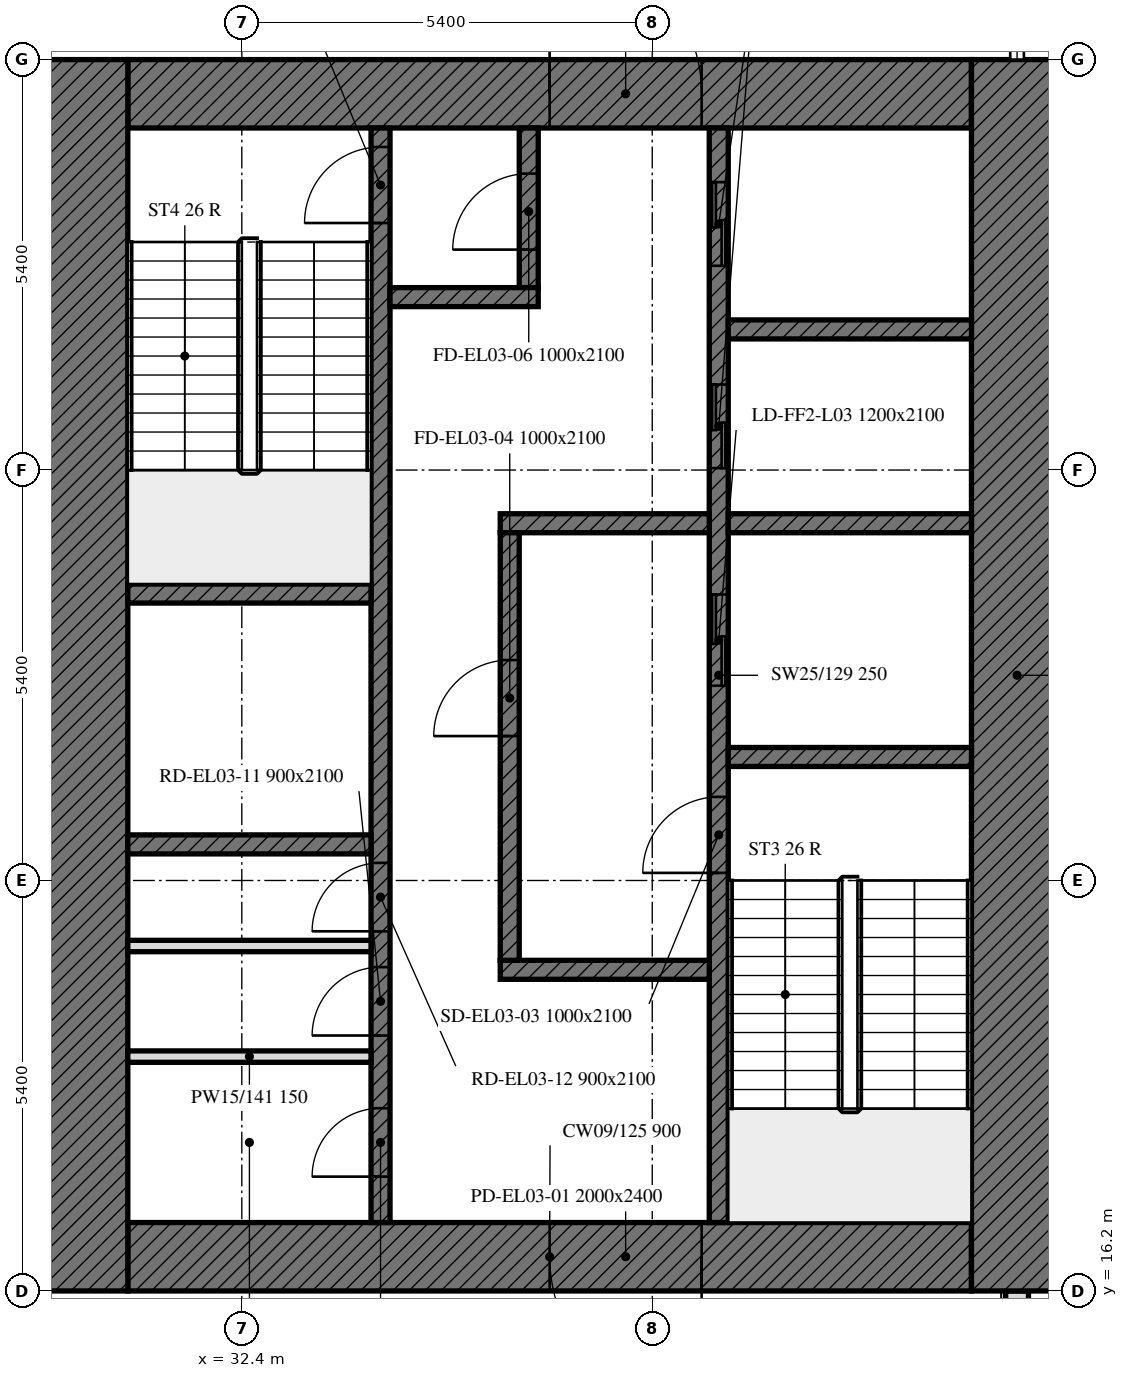
"""IFC4 building model, lengths in metres.
Left out: names, types, materials, properties, quantities, classifications, styles, units other than length and angle.
Written with IfcOpenShell. Run it as: python <this file> out.ifc"""

import sys

from ifc_helpers import new_model, si_unit, direction, frame, frame_2d, origin, place, context, subcontext, project, spatial, rectangle, extrude, element, fill, save


model = new_model("IFC4")
c1 = context("Model", 3, precision=1e-05, world=origin(), true_north=direction((0.0, 1.0)))
c2 = subcontext(c1, "Body", "Model", "MODEL_VIEW")
j1 = project(units=[si_unit("LENGTHUNIT", "METRE"), si_unit("PLANEANGLEUNIT", "RADIAN")], contexts=[c1])
p1 = place(None, origin())
s1 = spatial("IfcSite", under=j1, at=p1, CompositionType="ELEMENT")
p2 = place(p1, origin())
s2 = spatial("IfcBuilding", under=s1, at=p2, CompositionType="ELEMENT")
p3 = place(p2, frame((0.0, 0.0, 19.8)))
s3 = spatial("IfcBuildingStorey", under=s2, at=p3, CompositionType="ELEMENT", Elevation=19.8)
p4 = place(p3, frame((42.6, 5.586, 0.0), z_axis=(0.0, 0.0, 1.0), x_axis=(0.0, 1.0, 0.0)))
e1 = element("IfcWall", 1, at=p4, inside=s3, PredefinedType="SOLIDWALL", context=c2, shape_type="SweptSolid", body=[
    extrude(rectangle(XDim=10.614, YDim=0.3, at=frame_2d((5.307, 0.0))), origin(), (0.0, 0.0, 1.0), 4.4),
])
p5 = place(p4, frame((1.614, 0.0, 0.0)))
e2 = element("IfcOpeningElement", 2, at=p5, cuts=e1, PredefinedType="OPENING", context=c2, shape_type="SweptSolid", body=[
    extrude(rectangle(XDim=1.8, YDim=2.4, at=frame_2d((0.9, 1.2))), frame((0.0, 0.16, 0.0), z_axis=(0.0, -1.0, 0.0), x_axis=(1.0, 0.0, 0.0)), (0.0, 0.0, 1.0), 0.32),
])
p6 = place(p4, frame((6.114, 0.0, 0.0)))
e3 = element("IfcOpeningElement", 3, at=p6, cuts=e1, PredefinedType="OPENING", context=c2, shape_type="SweptSolid", body=[
    extrude(rectangle(XDim=1.8, YDim=2.4, at=frame_2d((0.9, 1.2))), frame((0.0, 0.16, 0.0), z_axis=(0.0, -1.0, 0.0), x_axis=(1.0, 0.0, 0.0)), (0.0, 0.0, 1.0), 0.32),
])
p7 = place(p3, frame((42.0, 16.65, 0.0), z_axis=(0.0, 0.0, 1.0), x_axis=(-1.0, 0.0, 0.0)))
e4 = element("IfcWall", 4, at=p7, inside=s3, PredefinedType="SOLIDWALL", context=c2, shape_type="SweptSolid", body=[
    extrude(rectangle(XDim=11.1, YDim=0.9, at=frame_2d((5.55, 0.0))), origin(), (0.0, 0.0, 1.0), 4.4),
])
p8 = place(p7, frame((3.55, 0.0, 0.0)))
e5 = element("IfcOpeningElement", 5, at=p8, cuts=e4, PredefinedType="OPENING", context=c2, shape_type="SweptSolid", body=[
    extrude(rectangle(XDim=2.0, YDim=2.4, at=frame_2d((1.0, 1.2))), frame((0.0, 0.45, 0.0), z_axis=(0.0, -1.0, 0.0), x_axis=(1.0, 0.0, 0.0)), (0.0, 0.0, 1.0), 0.9),
])
p9 = place(p3, frame((30.9, 31.95, 0.0), z_axis=(0.0, 0.0, 1.0), x_axis=(1.0, 0.0, 0.0)))
e6 = element("IfcWall", 6, at=p9, inside=s3, PredefinedType="SOLIDWALL", context=c2, shape_type="SweptSolid", body=[
    extrude(rectangle(XDim=11.1, YDim=0.9, at=frame_2d((5.55, 0.0))), origin(), (0.0, 0.0, 1.0), 4.4),
])
p10 = place(p9, frame((5.55, 0.0, 0.0)))
e7 = element("IfcOpeningElement", 7, at=p10, cuts=e6, PredefinedType="OPENING", context=c2, shape_type="SweptSolid", body=[
    extrude(rectangle(XDim=2.0, YDim=2.4, at=frame_2d((1.0, 1.2))), frame((0.0, 0.45, 0.0), z_axis=(0.0, -1.0, 0.0), x_axis=(1.0, 0.0, 0.0)), (0.0, 0.0, 1.0), 0.9),
])
for number, where, z_axis, x_axis in (
    (8, (42.6, 32.4, 0.0), (0.0, 0.0, 1.0), (0.0, -1.0, 0.0)),
    (9, (30.3, 16.2, 0.0), (0.0, 0.0, 1.0), (0.0, 1.0, 0.0)),
):
    element("IfcWall", number, at=place(p3, frame(where, z_axis=z_axis, x_axis=x_axis)), inside=s3, PredefinedType="SOLIDWALL", context=c2, shape_type="SweptSolid", body=[
        extrude(rectangle(XDim=16.2, YDim=1.2, at=frame_2d((8.1, 0.0))), origin(), (0.0, 0.0, 1.0), 4.4),
    ])
p11 = place(p3, frame((38.675, 17.1, 0.0), z_axis=(0.0, 0.0, 1.0), x_axis=(0.0, 1.0, 0.0)))
e10 = element("IfcWall", 10, at=p11, inside=s3, PredefinedType="SOLIDWALL", context=c2, shape_type="SweptSolid", body=[
    extrude(rectangle(XDim=14.4, YDim=0.25, at=frame_2d((7.2, 0.0))), origin(), (0.0, 0.0, 1.0), 4.4),
])
p12 = place(p11, frame((4.6, 0.0, 0.0)))
e11 = element("IfcOpeningElement", 11, at=p12, cuts=e10, PredefinedType="OPENING", context=c2, shape_type="SweptSolid", body=[
    extrude(rectangle(XDim=1.0, YDim=2.1, at=frame_2d((0.5, 1.05))), frame((0.0, 0.125, 0.0), z_axis=(0.0, -1.0, 0.0), x_axis=(1.0, 0.0, 0.0)), (0.0, 0.0, 1.0), 0.25),
])
p13 = place(p11, frame((7.062, 0.0, 0.0)))
e12 = element("IfcOpeningElement", 12, at=p13, cuts=e10, PredefinedType="OPENING", context=c2, shape_type="SweptSolid", body=[
    extrude(rectangle(XDim=1.2, YDim=2.1, at=frame_2d((0.6, 1.05))), frame((0.0, 0.125, 0.0), z_axis=(0.0, -1.0, 0.0), x_axis=(1.0, 0.0, 0.0)), (0.0, 0.0, 1.0), 0.25),
])
p14 = place(p11, frame((9.925, 0.0, 0.0)))
e13 = element("IfcOpeningElement", 13, at=p14, cuts=e10, PredefinedType="OPENING", context=c2, shape_type="SweptSolid", body=[
    extrude(rectangle(XDim=1.1, YDim=2.1, at=frame_2d((0.55, 1.05))), frame((0.0, 0.125, 0.0), z_axis=(0.0, -1.0, 0.0), x_axis=(1.0, 0.0, 0.0)), (0.0, 0.0, 1.0), 0.25),
])
p15 = place(p11, frame((12.587, 0.0, 0.0)))
e14 = element("IfcOpeningElement", 14, at=p15, cuts=e10, PredefinedType="OPENING", context=c2, shape_type="SweptSolid", body=[
    extrude(rectangle(XDim=1.1, YDim=2.1, at=frame_2d((0.55, 1.05))), frame((0.0, 0.125, 0.0), z_axis=(0.0, -1.0, 0.0), x_axis=(1.0, 0.0, 0.0)), (0.0, 0.0, 1.0), 0.25),
])
p16 = place(p3, frame((34.225, 17.1, 0.0), z_axis=(0.0, 0.0, 1.0), x_axis=(0.0, 1.0, 0.0)))
e15 = element("IfcWall", 15, at=p16, inside=s3, PredefinedType="SOLIDWALL", context=c2, shape_type="SweptSolid", body=[
    extrude(rectangle(XDim=14.4, YDim=0.25, at=frame_2d((7.2, 0.0))), origin(), (0.0, 0.0, 1.0), 4.4),
])
p17 = place(p16, frame((13.15, 0.0, 0.0)))
e16 = element("IfcOpeningElement", 16, at=p17, cuts=e15, PredefinedType="OPENING", context=c2, shape_type="SweptSolid", body=[
    extrude(rectangle(XDim=1.0, YDim=2.1, at=frame_2d((0.5, 1.05))), frame((0.0, 0.125, 0.0), z_axis=(0.0, -1.0, 0.0), x_axis=(1.0, 0.0, 0.0)), (0.0, 0.0, 1.0), 0.25),
])
p18 = place(p16, frame((0.604, 0.0, 0.0)))
e17 = element("IfcOpeningElement", 17, at=p18, cuts=e15, PredefinedType="OPENING", context=c2, shape_type="SweptSolid", body=[
    extrude(rectangle(XDim=0.9, YDim=2.1, at=frame_2d((0.45, 1.05))), frame((0.0, 0.125, 0.0), z_axis=(0.0, -1.0, 0.0), x_axis=(1.0, 0.0, 0.0)), (0.0, 0.0, 1.0), 0.25),
])
p19 = place(p16, frame((2.46, 0.0, 0.0)))
e18 = element("IfcOpeningElement", 18, at=p19, cuts=e15, PredefinedType="OPENING", context=c2, shape_type="SweptSolid", body=[
    extrude(rectangle(XDim=0.9, YDim=2.1, at=frame_2d((0.45, 1.05))), frame((0.0, 0.125, 0.0), z_axis=(0.0, -1.0, 0.0), x_axis=(1.0, 0.0, 0.0)), (0.0, 0.0, 1.0), 0.25),
])
p20 = place(p16, frame((3.832, 0.0, 0.0)))
e19 = element("IfcOpeningElement", 19, at=p20, cuts=e15, PredefinedType="OPENING", context=c2, shape_type="SweptSolid", body=[
    extrude(rectangle(XDim=0.9, YDim=2.1, at=frame_2d((0.45, 1.05))), frame((0.0, 0.125, 0.0), z_axis=(0.0, -1.0, 0.0), x_axis=(1.0, 0.0, 0.0)), (0.0, 0.0, 1.0), 0.25),
])
p21 = place(p3, frame((38.8, 23.225, 0.0), z_axis=(0.0, 0.0, 1.0), x_axis=(1.0, 0.0, 0.0)))
e20 = element("IfcWall", 20, at=p21, inside=s3, PredefinedType="SOLIDWALL", context=c2, shape_type="SweptSolid", body=[
    extrude(rectangle(XDim=3.2, YDim=0.25, at=frame_2d((1.6, 0.0))), origin(), (0.0, 0.0, 1.0), 4.4),
])
for number, where, z_axis, x_axis in (
    (21, (30.9, 25.375, 0.0), (0.0, 0.0, 1.0), (1.0, 0.0, 0.0)),
    (22, (30.9, 22.075, 0.0), (0.0, 0.0, 1.0), (1.0, 0.0, 0.0)),
):
    element("IfcWall", number, at=place(p3, frame(where, z_axis=z_axis, x_axis=x_axis)), inside=s3, PredefinedType="SOLIDWALL", context=c2, shape_type="SweptSolid", body=[
        extrude(rectangle(XDim=3.2, YDim=0.25, at=frame_2d((1.6, 0.0))), origin(), (0.0, 0.0, 1.0), 4.4),
    ])
p22 = place(p3, frame((38.8, 26.3, 0.0), z_axis=(0.0, 0.0, 1.0), x_axis=(1.0, 0.0, 0.0)))
e23 = element("IfcWall", 23, at=p22, inside=s3, PredefinedType="SOLIDWALL", context=c2, shape_type="SweptSolid", body=[
    extrude(rectangle(XDim=3.2, YDim=0.25, at=frame_2d((1.6, 0.0))), origin(), (0.0, 0.0, 1.0), 4.4),
])
for number, where, z_axis, x_axis in (
    (24, (35.8, 26.3, 0.0), (0.0, 0.0, 1.0), (1.0, 0.0, 0.0)),
    (25, (35.8, 20.425, 0.0), (0.0, 0.0, 1.0), (1.0, 0.0, 0.0)),
):
    element("IfcWall", number, at=place(p3, frame(where, z_axis=z_axis, x_axis=x_axis)), inside=s3, PredefinedType="SOLIDWALL", context=c2, shape_type="SweptSolid", body=[
        extrude(rectangle(XDim=2.75, YDim=0.25, at=frame_2d((1.375, 0.0))), origin(), (0.0, 0.0, 1.0), 4.4),
    ])
p23 = place(p3, frame((36.175, 29.4, 0.0), z_axis=(0.0, 0.0, 1.0), x_axis=(0.0, 1.0, 0.0)))
e26 = element("IfcWall", 26, at=p23, inside=s3, PredefinedType="SOLIDWALL", context=c2, shape_type="SweptSolid", body=[
    extrude(rectangle(XDim=2.1, YDim=0.25, at=frame_2d((1.05, 0.0))), origin(), (0.0, 0.0, 1.0), 4.4),
])
p24 = place(p23, frame((0.5, 0.0, 0.0)))
e27 = element("IfcOpeningElement", 27, at=p24, cuts=e26, PredefinedType="OPENING", context=c2, shape_type="SweptSolid", body=[
    extrude(rectangle(XDim=1.0, YDim=2.1, at=frame_2d((0.5, 1.05))), frame((0.0, 0.125, 0.0), z_axis=(0.0, -1.0, 0.0), x_axis=(1.0, 0.0, 0.0)), (0.0, 0.0, 1.0), 0.25),
])
p25 = place(p3, frame((34.35, 29.275, 0.0), z_axis=(0.0, 0.0, 1.0), x_axis=(1.0, 0.0, 0.0)))
e28 = element("IfcWall", 28, at=p25, inside=s3, PredefinedType="SOLIDWALL", context=c2, shape_type="SweptSolid", body=[
    extrude(rectangle(XDim=1.95, YDim=0.25, at=frame_2d((0.975, 0.0))), origin(), (0.0, 0.0, 1.0), 4.4),
])
p26 = place(p3, frame((35.925, 20.55, 0.0), z_axis=(0.0, 0.0, 1.0), x_axis=(0.0, 1.0, 0.0)))
e29 = element("IfcWall", 29, at=p26, inside=s3, PredefinedType="SOLIDWALL", context=c2, shape_type="SweptSolid", body=[
    extrude(rectangle(XDim=5.625, YDim=0.25, at=frame_2d((2.812, 0.0))), origin(), (0.0, 0.0, 1.0), 4.4),
])
p27 = place(p26, frame((2.95, 0.0, 0.0)))
e30 = element("IfcOpeningElement", 30, at=p27, cuts=e29, PredefinedType="OPENING", context=c2, shape_type="SweptSolid", body=[
    extrude(rectangle(XDim=1.0, YDim=2.1, at=frame_2d((0.5, 1.05))), frame((0.0, 0.125, 0.0), z_axis=(0.0, -1.0, 0.0), x_axis=(1.0, 0.0, 0.0)), (0.0, 0.0, 1.0), 0.25),
])
p28 = place(p3, frame((38.8, 28.85, 0.0), z_axis=(0.0, 0.0, 1.0), x_axis=(1.0, 0.0, 0.0)))
e31 = element("IfcWall", 31, at=p28, inside=s3, PredefinedType="SOLIDWALL", context=c2, shape_type="SweptSolid", body=[
    extrude(rectangle(XDim=3.2, YDim=0.25, at=frame_2d((1.6, 0.0))), origin(), (0.0, 0.0, 1.0), 4.4),
])
for number, where, z_axis, x_axis in (
    (32, (30.9, 19.283, 0.0), (0.0, 0.0, 1.0), (1.0, 0.0, 0.0)),
    (33, (30.9, 20.738, 0.0), (0.0, 0.0, 1.0), (1.0, 0.0, 0.0)),
):
    element("IfcWall", number, at=place(p3, frame(where, z_axis=z_axis, x_axis=x_axis)), inside=s3, PredefinedType="PARTITIONING", context=c2, shape_type="SweptSolid", body=[
        extrude(rectangle(XDim=3.2, YDim=0.15, at=frame_2d((1.6, 0.0))), origin(), (0.0, 0.0, 1.0), 4.4),
    ])
p29 = place(p8, origin())
e34 = element("IfcDoor", 34, at=p29, inside=s3, OperationType="DOUBLE_DOOR_SINGLE_SWING", PredefinedType="DOOR", context=c2, shape_type="SweptSolid", body=[
    extrude(rectangle(XDim=2.0, YDim=2.4, at=frame_2d((1.0, 1.2))), frame((0.0, 0.025, 0.0), z_axis=(0.0, -1.0, 0.0), x_axis=(1.0, 0.0, 0.0)), (0.0, 0.0, 1.0), 0.05),
])
fill(e5, e34)
p30 = place(p10, origin())
e35 = element("IfcDoor", 35, at=p30, inside=s3, OperationType="DOUBLE_DOOR_SINGLE_SWING", PredefinedType="DOOR", context=c2, shape_type="SweptSolid", body=[
    extrude(rectangle(XDim=2.0, YDim=2.4, at=frame_2d((1.0, 1.2))), frame((0.0, 0.025, 0.0), z_axis=(0.0, -1.0, 0.0), x_axis=(1.0, 0.0, 0.0)), (0.0, 0.0, 1.0), 0.05),
])
fill(e7, e35)
p31 = place(p12, origin())
e36 = element("IfcDoor", 36, at=p31, inside=s3, OperationType="SINGLE_SWING_LEFT", PredefinedType="DOOR", context=c2, shape_type="SweptSolid", body=[
    extrude(rectangle(XDim=1.0, YDim=2.1, at=frame_2d((0.5, 1.05))), frame((0.0, 0.025, 0.0), z_axis=(0.0, -1.0, 0.0), x_axis=(1.0, 0.0, 0.0)), (0.0, 0.0, 1.0), 0.05),
])
fill(e11, e36)
p32 = place(p27, origin())
e37 = element("IfcDoor", 37, at=p32, inside=s3, OperationType="SINGLE_SWING_LEFT", PredefinedType="DOOR", context=c2, shape_type="SweptSolid", body=[
    extrude(rectangle(XDim=1.0, YDim=2.1, at=frame_2d((0.5, 1.05))), frame((0.0, 0.025, 0.0), z_axis=(0.0, -1.0, 0.0), x_axis=(1.0, 0.0, 0.0)), (0.0, 0.0, 1.0), 0.05),
])
fill(e30, e37)
p33 = place(p17, origin())
e38 = element("IfcDoor", 38, at=p33, inside=s3, OperationType="SINGLE_SWING_LEFT", PredefinedType="DOOR", context=c2, shape_type="SweptSolid", body=[
    extrude(rectangle(XDim=1.0, YDim=2.1, at=frame_2d((0.5, 1.05))), frame((0.0, 0.025, 0.0), z_axis=(0.0, -1.0, 0.0), x_axis=(1.0, 0.0, 0.0)), (0.0, 0.0, 1.0), 0.05),
])
fill(e16, e38)
p34 = place(p24, origin())
e39 = element("IfcDoor", 39, at=p34, inside=s3, OperationType="SINGLE_SWING_LEFT", PredefinedType="DOOR", context=c2, shape_type="SweptSolid", body=[
    extrude(rectangle(XDim=1.0, YDim=2.1, at=frame_2d((0.5, 1.05))), frame((0.0, 0.025, 0.0), z_axis=(0.0, -1.0, 0.0), x_axis=(1.0, 0.0, 0.0)), (0.0, 0.0, 1.0), 0.05),
])
fill(e27, e39)
p35 = place(p13, origin())
e40 = element("IfcDoor", 40, at=p35, inside=s3, OperationType="DOUBLE_DOOR_SLIDING", PredefinedType="DOOR", context=c2, shape_type="SweptSolid", body=[
    extrude(rectangle(XDim=1.2, YDim=2.1, at=frame_2d((0.6, 1.05))), frame((0.0, 0.025, 0.0), z_axis=(0.0, -1.0, 0.0), x_axis=(1.0, 0.0, 0.0)), (0.0, 0.0, 1.0), 0.05),
])
fill(e12, e40)
p36 = place(p14, origin())
e41 = element("IfcDoor", 41, at=p36, inside=s3, OperationType="DOUBLE_DOOR_SLIDING", PredefinedType="DOOR", context=c2, shape_type="SweptSolid", body=[
    extrude(rectangle(XDim=1.1, YDim=2.1, at=frame_2d((0.55, 1.05))), frame((0.0, 0.025, 0.0), z_axis=(0.0, -1.0, 0.0), x_axis=(1.0, 0.0, 0.0)), (0.0, 0.0, 1.0), 0.05),
])
fill(e13, e41)
p37 = place(p15, origin())
e42 = element("IfcDoor", 42, at=p37, inside=s3, OperationType="DOUBLE_DOOR_SLIDING", PredefinedType="DOOR", context=c2, shape_type="SweptSolid", body=[
    extrude(rectangle(XDim=1.1, YDim=2.1, at=frame_2d((0.55, 1.05))), frame((0.0, 0.025, 0.0), z_axis=(0.0, -1.0, 0.0), x_axis=(1.0, 0.0, 0.0)), (0.0, 0.0, 1.0), 0.05),
])
fill(e14, e42)
p38 = place(p18, origin())
e43 = element("IfcDoor", 43, at=p38, inside=s3, OperationType="SINGLE_SWING_LEFT", PredefinedType="DOOR", context=c2, shape_type="SweptSolid", body=[
    extrude(rectangle(XDim=0.9, YDim=2.1, at=frame_2d((0.45, 1.05))), frame((0.0, 0.025, 0.0), z_axis=(0.0, -1.0, 0.0), x_axis=(1.0, 0.0, 0.0)), (0.0, 0.0, 1.0), 0.05),
])
fill(e17, e43)
p39 = place(p19, origin())
e44 = element("IfcDoor", 44, at=p39, inside=s3, OperationType="SINGLE_SWING_LEFT", PredefinedType="DOOR", context=c2, shape_type="SweptSolid", body=[
    extrude(rectangle(XDim=0.9, YDim=2.1, at=frame_2d((0.45, 1.05))), frame((0.0, 0.025, 0.0), z_axis=(0.0, -1.0, 0.0), x_axis=(1.0, 0.0, 0.0)), (0.0, 0.0, 1.0), 0.05),
])
fill(e18, e44)
p40 = place(p20, origin())
e45 = element("IfcDoor", 45, at=p40, inside=s3, OperationType="SINGLE_SWING_LEFT", PredefinedType="DOOR", context=c2, shape_type="SweptSolid", body=[
    extrude(rectangle(XDim=0.9, YDim=2.1, at=frame_2d((0.45, 1.05))), frame((0.0, 0.025, 0.0), z_axis=(0.0, -1.0, 0.0), x_axis=(1.0, 0.0, 0.0)), (0.0, 0.0, 1.0), 0.05),
])
fill(e19, e45)
save(model, sys.argv[1])
